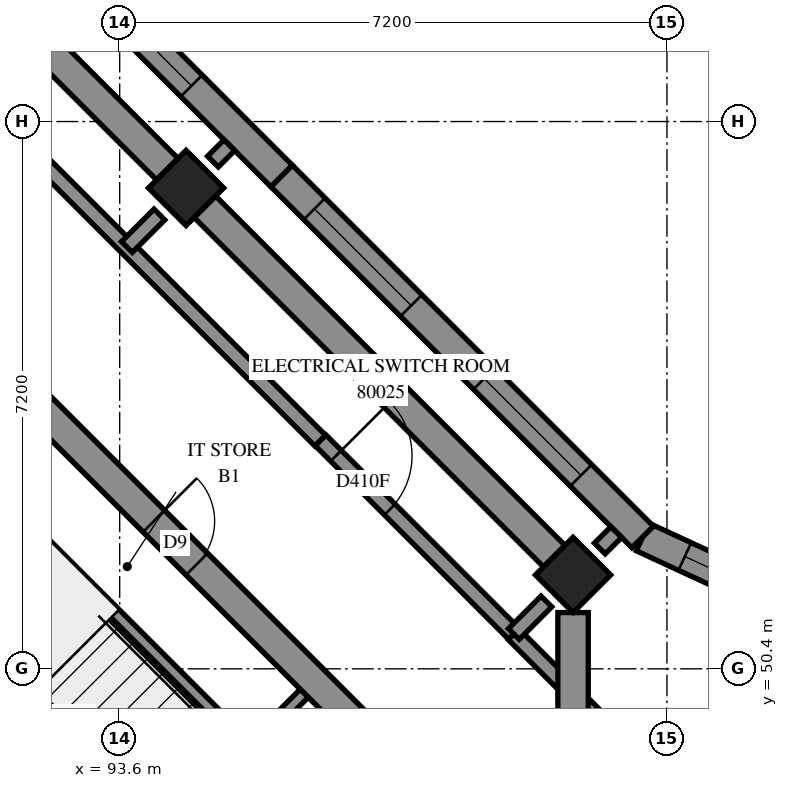
"""IFC4 building model, lengths in metres.
Left out: names, types, materials, properties, quantities, classifications, styles, units other than length and angle.
Written with IfcOpenShell. Run it as: python <this file> out.ifc"""

import sys

from ifc_helpers import new_model, si_unit, direction, frame, frame_2d, origin, origin_2d, place, context, subcontext, project, spatial, polyline, rectangle, outline, extrude, element, fill, save


model = new_model("IFC4")
c1 = context("Model", 3, precision=1e-05, world=origin(), true_north=direction((0.0, 1.0)))
c2 = subcontext(c1, "Body", "Model", "MODEL_VIEW")
j1 = project(units=[si_unit("LENGTHUNIT", "METRE"), si_unit("PLANEANGLEUNIT", "RADIAN")], contexts=[c1])
p1 = place(None, origin())
s1 = spatial("IfcSite", under=j1, at=p1, CompositionType="ELEMENT")
p2 = place(p1, origin())
s2 = spatial("IfcBuilding", under=s1, at=p2, CompositionType="ELEMENT")
p3 = place(p2, frame((0.0, 0.0, 294.4)))
s3 = spatial("IfcBuildingStorey", under=s2, at=p3, CompositionType="ELEMENT", Elevation=294.4)
for number, where, z_axis, x_axis in (
    (1, (94.474, 56.727, 0.0), (0.0, 0.0, 1.0), (0.707, -0.707, 0.0)),
    (2, (99.565, 51.635, 0.0), (0.0, 0.0, 1.0), (0.707, -0.707, 0.0)),
):
    element("IfcColumn", number, at=place(p3, frame(where, z_axis=z_axis, x_axis=x_axis)), inside=s3, PredefinedType="COLUMN", context=c2, shape_type="SweptSolid", body=[
        extrude(rectangle(XDim=0.7, YDim=0.7, at=origin_2d()), origin(), (0.0, 0.0, 1.0), 3.5),
    ])
p4 = place(p3, frame((86.695, 59.696, -0.3), z_axis=(0.0, 0.0, 1.0), x_axis=(0.7071100706, -0.7071034917, 0.0)))
e3 = element("IfcWall", 3, at=p4, inside=s3, PredefinedType="SHEAR", context=c2, shape_type="SweptSolid", body=[
    extrude(outline(polyline([(0.0, 0.0), (15.2, 0.0), (15.2, 3.1), (0.0, 3.1), (0.0, 0.0)])), frame((0.0, 0.2, 0.0), z_axis=(0.0, -1.0, 0.0), x_axis=(1.0, 0.0, 0.0)), (0.0, 0.0, 1.0), 0.4),
])
p5 = place(p4, frame((10.4, 0.0, 0.3)))
e4 = element("IfcOpeningElement", 4, at=p5, cuts=e3, PredefinedType="OPENING", context=c2, shape_type="SweptSolid", body=[
    extrude(rectangle(XDim=0.8, YDim=2.1, at=frame_2d((0.4, 1.05))), frame((0.0, 0.21, 0.0), z_axis=(0.0, -1.0, 0.0), x_axis=(1.0, 0.0, 0.0)), (0.0, 0.0, 1.0), 0.42),
])
p6 = place(p3, frame((88.958, 51.211, 0.0), z_axis=(0.0, 0.0, 1.0), x_axis=(0.7070998367, -0.7071137256, 0.0)))
e5 = element("IfcWall", 5, at=p6, inside=s3, PredefinedType="SOLIDWALL", context=c2, shape_type="SweptSolid", body=[
    extrude(outline(polyline([(0.0, 0.0), (7.2, 0.0), (7.2, 3.5), (0.0, 3.5), (0.0, 0.0)])), frame((0.0, 0.15, 0.0), z_axis=(0.0, -1.0, 0.0), x_axis=(1.0, 0.0, 0.0)), (0.0, 0.0, 1.0), 0.3),
])
p7 = place(p3, frame((99.282, 46.544, 0.0), z_axis=(0.0, 0.0, 1.0), x_axis=(0.7071067812, 0.7071067812, 0.0)))
e6 = element("IfcWall", 6, at=p7, inside=s3, PredefinedType="SOLIDWALL", context=c2, shape_type="SweptSolid", body=[
    extrude(outline(polyline([(0.2, -0.2), (6.23, -0.2), (5.657, 0.2), (-0.2, 0.2), (0.2, -0.2)])), origin(), (0.0, 0.0, 1.0), 3.5),
])
p8 = place(p7, frame((0.75, 0.0, 0.7)))
e7 = element("IfcOpeningElement", 7, at=p8, cuts=e6, PredefinedType="OPENING", context=c2, shape_type="SweptSolid", body=[
    extrude(rectangle(XDim=1.8, YDim=2.2, at=frame_2d((0.9, 1.1))), frame((0.0, 0.21, 0.0), z_axis=(0.0, -1.0, 0.0), x_axis=(1.0, 0.0, 0.0)), (0.0, 0.0, 1.0), 0.42),
])
p9 = place(p3, frame((103.484, 50.747, 0.0), z_axis=(0.0, 0.0, 1.0), x_axis=(-0.9078558767, 0.4192823716, 0.0)))
e8 = element("IfcWall", 8, at=p9, inside=s3, PredefinedType="SOLIDWALL", context=c2, shape_type="SweptSolid", body=[
    extrude(outline(polyline([(-0.287, -0.2), (3.273, -0.2), (3.345, 0.2), (0.287, 0.2), (-0.287, -0.2)])), origin(), (0.0, 0.0, 1.0), 3.5),
])
p10 = place(p9, frame((0.898, 0.0, 0.7)))
e9 = element("IfcOpeningElement", 9, at=p10, cuts=e8, PredefinedType="OPENING", context=c2, shape_type="SweptSolid", body=[
    extrude(rectangle(XDim=1.8, YDim=2.2, at=frame_2d((0.9, 1.1))), frame((0.0, 0.21, 0.0), z_axis=(0.0, -1.0, 0.0), x_axis=(1.0, 0.0, 0.0)), (0.0, 0.0, 1.0), 0.42),
])
p11 = place(p3, frame((100.48, 52.134, 0.0), z_axis=(0.0, 0.0, 1.0), x_axis=(-0.7071067812, 0.7071067812, 0.0)))
e10 = element("IfcWall", 10, at=p11, inside=s3, PredefinedType="SOLIDWALL", context=c2, shape_type="SweptSolid", body=[
    extrude(outline(polyline([(0.036, -0.2), (6.718, -0.2), (6.718, 0.2), (-0.036, 0.2), (0.036, -0.2)])), origin(), (0.0, 0.0, 1.0), 3.5),
])
p12 = place(p11, frame((1.147, 0.0, 0.7)))
e11 = element("IfcOpeningElement", 11, at=p12, cuts=e10, PredefinedType="OPENING", context=c2, shape_type="SweptSolid", body=[
    extrude(rectangle(XDim=1.8, YDim=2.2, at=frame_2d((0.9, 1.1))), frame((0.0, 0.21, 0.0), z_axis=(0.0, -1.0, 0.0), x_axis=(1.0, 0.0, 0.0)), (0.0, 0.0, 1.0), 0.42),
])
p13 = place(p11, frame((4.306, 0.0, 0.7)))
e12 = element("IfcOpeningElement", 12, at=p13, cuts=e10, PredefinedType="OPENING", context=c2, shape_type="SweptSolid", body=[
    extrude(rectangle(XDim=1.8, YDim=2.2, at=frame_2d((0.9, 1.1))), frame((0.0, 0.21, 0.0), z_axis=(0.0, -1.0, 0.0), x_axis=(1.0, 0.0, 0.0)), (0.0, 0.0, 1.0), 0.42),
])
p14 = place(p3, frame((95.73, 56.884, 0.0), z_axis=(0.0, 0.0, 1.0), x_axis=(-0.7071067812, 0.7071067812, 0.0)))
e13 = element("IfcWall", 13, at=p14, inside=s3, PredefinedType="SOLIDWALL", context=c2, shape_type="SweptSolid", body=[
    extrude(outline(polyline([(0.0, -0.2), (6.682, -0.2), (6.682, 0.2), (0.0, 0.2), (0.0, -0.2)])), origin(), (0.0, 0.0, 1.0), 3.5),
])
p15 = place(p14, frame((1.677, 0.0, 0.7)))
e14 = element("IfcOpeningElement", 14, at=p15, cuts=e13, PredefinedType="OPENING", context=c2, shape_type="SweptSolid", body=[
    extrude(rectangle(XDim=1.8, YDim=2.2, at=frame_2d((0.9, 1.1))), frame((0.0, 0.21, 0.0), z_axis=(0.0, -1.0, 0.0), x_axis=(1.0, 0.0, 0.0)), (0.0, 0.0, 1.0), 0.42),
])
p16 = place(p14, frame((4.529, 0.0, 0.7)))
e15 = element("IfcOpeningElement", 15, at=p16, cuts=e13, PredefinedType="OPENING", context=c2, shape_type="SweptSolid", body=[
    extrude(rectangle(XDim=1.8, YDim=2.2, at=frame_2d((0.9, 1.1))), frame((0.0, 0.21, 0.0), z_axis=(0.0, -1.0, 0.0), x_axis=(1.0, 0.0, 0.0)), (0.0, 0.0, 1.0), 0.42),
])
p17 = place(p3, frame((91.313, 53.354, 0.0), z_axis=(0.0, 0.0, 1.0), x_axis=(0.7071067812, -0.7071067812, 0.0)))
e16 = element("IfcWall", 16, at=p17, inside=s3, PredefinedType="PARTITIONING", context=c2, shape_type="SweptSolid", body=[
    extrude(outline(polyline([(0.0, 0.0), (5.65, 0.0), (5.65, 3.5), (0.0, 3.5), (0.0, 0.0)])), frame((0.0, 0.075, 0.0), z_axis=(0.0, -1.0, 0.0), x_axis=(1.0, 0.0, 0.0)), (0.0, 0.0, 1.0), 0.15),
])
p18 = place(p3, frame((95.308, 49.358, 0.0), z_axis=(0.0, 0.0, 1.0), x_axis=(0.70705776, 0.707155799, 0.0)))
e17 = element("IfcWall", 17, at=p18, inside=s3, PredefinedType="PARTITIONING", context=c2, shape_type="SweptSolid", body=[
    extrude(outline(polyline([(0.0, 0.0), (1.02, 0.0), (1.02, 3.5), (0.0, 3.5), (0.0, 0.0)])), frame((0.0, 0.075, 0.0), z_axis=(0.0, -1.0, 0.0), x_axis=(1.0, 0.0, 0.0)), (0.0, 0.0, 1.0), 0.15),
])
p19 = place(p3, frame((86.833, 62.805, 0.0), z_axis=(0.0, 0.0, 1.0), x_axis=(0.7072045138, -0.7070090351, 0.0)))
e18 = element("IfcWall", 18, at=p19, inside=s3, PredefinedType="PARTITIONING", context=c2, shape_type="SweptSolid", body=[
    extrude(rectangle(XDim=13.301, YDim=0.2, at=frame_2d((6.65, 0.0))), origin(), (0.0, 0.0, 1.0), 3.5),
])
p20 = place(p19, frame((6.387, 0.0, 0.0)))
e19 = element("IfcOpeningElement", 19, at=p20, cuts=e18, PredefinedType="OPENING", context=c2, shape_type="SweptSolid", body=[
    extrude(rectangle(XDim=1.0, YDim=2.1, at=frame_2d((0.5, 1.05))), frame((0.0, 0.11, 0.0), z_axis=(0.0, -1.0, 0.0), x_axis=(1.0, 0.0, 0.0)), (0.0, 0.0, 1.0), 0.22),
])
p21 = place(p3, frame((96.244, 53.406, 0.0), z_axis=(0.0, 0.0, 1.0), x_axis=(0.7068288851, -0.7073845681, 0.0)))
e20 = element("IfcWall", 20, at=p21, inside=s3, PredefinedType="PARTITIONING", context=c2, shape_type="SweptSolid", body=[
    extrude(rectangle(XDim=3.599, YDim=0.2, at=frame_2d((1.8, 0.0))), origin(), (0.0, 0.0, 1.0), 3.5),
])
p22 = place(p21, frame((0.286, 0.0, 0.0)))
e21 = element("IfcOpeningElement", 21, at=p22, cuts=e20, PredefinedType="OPENING", context=c2, shape_type="SweptSolid", body=[
    extrude(rectangle(XDim=1.0, YDim=2.1, at=frame_2d((0.5, 1.05))), frame((0.0, 0.11, 0.0), z_axis=(0.0, -1.0, 0.0), x_axis=(1.0, 0.0, 0.0)), (0.0, 0.0, 1.0), 0.22),
])
p23 = place(p3, frame((98.783, 50.855, 0.0), z_axis=(0.0, 0.0, 1.0), x_axis=(0.7071067812, -0.7071067812, 0.0)))
e22 = element("IfcWall", 22, at=p23, inside=s3, PredefinedType="PARTITIONING", context=c2, shape_type="SweptSolid", body=[
    extrude(rectangle(XDim=2.5, YDim=0.2, at=frame_2d((1.25, 0.0))), origin(), (0.0, 0.0, 1.0), 3.5),
])
for number, where, z_axis, x_axis in (
    (23, (98.786, 50.858, 0.0), (0.0, 0.0, 1.0), (0.707, 0.707, 0.0)),
    (24, (93.695, 55.949, 0.0), (0.0, 0.0, 1.0), (0.707, 0.707, 0.0)),
):
    element("IfcWall", number, at=place(p3, frame(where, z_axis=z_axis, x_axis=x_axis)), inside=s3, PredefinedType="PARTITIONING", context=c2, shape_type="SweptSolid", body=[
        extrude(rectangle(XDim=0.605, YDim=0.2, at=frame_2d((0.303, 0.0))), origin(), (0.0, 0.0, 1.0), 3.5),
    ])
p24 = place(p3, frame((99.917, 51.983, 0.0), z_axis=(0.0, 0.0, 1.0), x_axis=(0.7087439748, 0.7054657881, 0.0)))
e25 = element("IfcWall", 25, at=p24, inside=s3, PredefinedType="PARTITIONING", context=c2, shape_type="SweptSolid", body=[
    extrude(outline(polyline([(0.0, -0.1), (0.305, -0.1), (0.305, 0.1), (0.0, 0.1), (0.0, -0.1)])), origin(), (0.0, 0.0, 1.0), 3.5),
])
p25 = place(p3, frame((94.827, 57.073, 0.0), z_axis=(0.0, 0.0, 1.0), x_axis=(0.7053010617, 0.7089079012, 0.0)))
e26 = element("IfcWall", 26, at=p25, inside=s3, PredefinedType="PARTITIONING", context=c2, shape_type="SweptSolid", body=[
    extrude(outline(polyline([(0.0, -0.1), (0.305, -0.1), (0.305, 0.1), (0.0, 0.1), (0.0, -0.1)])), origin(), (0.0, 0.0, 1.0), 3.5),
])
p26 = place(p10, origin())
e27 = element("IfcWindow", 27, at=p26, inside=s3, PartitioningType="SINGLE_PANEL", PredefinedType="WINDOW", context=c2, shape_type="SweptSolid", body=[
    extrude(rectangle(XDim=1.8, YDim=2.2, at=frame_2d((0.9, 1.1))), frame((0.0, 0.08, 0.0), z_axis=(0.0, -1.0, 0.0), x_axis=(1.0, 0.0, 0.0)), (0.0, 0.0, 1.0), 0.06),
])
fill(e9, e27)
p27 = place(p12, origin())
e28 = element("IfcWindow", 28, at=p27, inside=s3, PartitioningType="SINGLE_PANEL", PredefinedType="WINDOW", context=c2, shape_type="SweptSolid", body=[
    extrude(rectangle(XDim=1.8, YDim=2.2, at=frame_2d((0.9, 1.1))), frame((0.0, 0.08, 0.0), z_axis=(0.0, -1.0, 0.0), x_axis=(1.0, 0.0, 0.0)), (0.0, 0.0, 1.0), 0.06),
])
fill(e11, e28)
p28 = place(p13, origin())
e29 = element("IfcWindow", 29, at=p28, inside=s3, PartitioningType="SINGLE_PANEL", PredefinedType="WINDOW", context=c2, shape_type="SweptSolid", body=[
    extrude(rectangle(XDim=1.8, YDim=2.2, at=frame_2d((0.9, 1.1))), frame((0.0, 0.08, 0.0), z_axis=(0.0, -1.0, 0.0), x_axis=(1.0, 0.0, 0.0)), (0.0, 0.0, 1.0), 0.06),
])
fill(e12, e29)
p29 = place(p15, origin())
e30 = element("IfcWindow", 30, at=p29, inside=s3, PartitioningType="SINGLE_PANEL", PredefinedType="WINDOW", context=c2, shape_type="SweptSolid", body=[
    extrude(rectangle(XDim=1.8, YDim=2.2, at=frame_2d((0.9, 1.1))), frame((0.0, 0.08, 0.0), z_axis=(0.0, -1.0, 0.0), x_axis=(1.0, 0.0, 0.0)), (0.0, 0.0, 1.0), 0.06),
])
fill(e14, e30)
p30 = place(p5, origin())
e31 = element("IfcDoor", 31, at=p30, inside=s3, OperationType="SINGLE_SWING_RIGHT", PredefinedType="DOOR", context=c2, shape_type="SweptSolid", body=[
    extrude(rectangle(XDim=0.8, YDim=2.1, at=frame_2d((0.4, 1.05))), frame((0.0, 0.025, 0.0), z_axis=(0.0, -1.0, 0.0), x_axis=(1.0, 0.0, 0.0)), (0.0, 0.0, 1.0), 0.05),
])
fill(e4, e31)
p31 = place(p22, origin())
e32 = element("IfcDoor", 32, at=p31, inside=s3, OperationType="SINGLE_SWING_LEFT", PredefinedType="DOOR", context=c2, shape_type="SweptSolid", body=[
    extrude(rectangle(XDim=1.0, YDim=2.1, at=frame_2d((0.5, 1.05))), frame((0.0, 0.025, 0.0), z_axis=(0.0, -1.0, 0.0), x_axis=(1.0, 0.0, 0.0)), (0.0, 0.0, 1.0), 0.05),
])
fill(e21, e32)
save(model, sys.argv[1])
